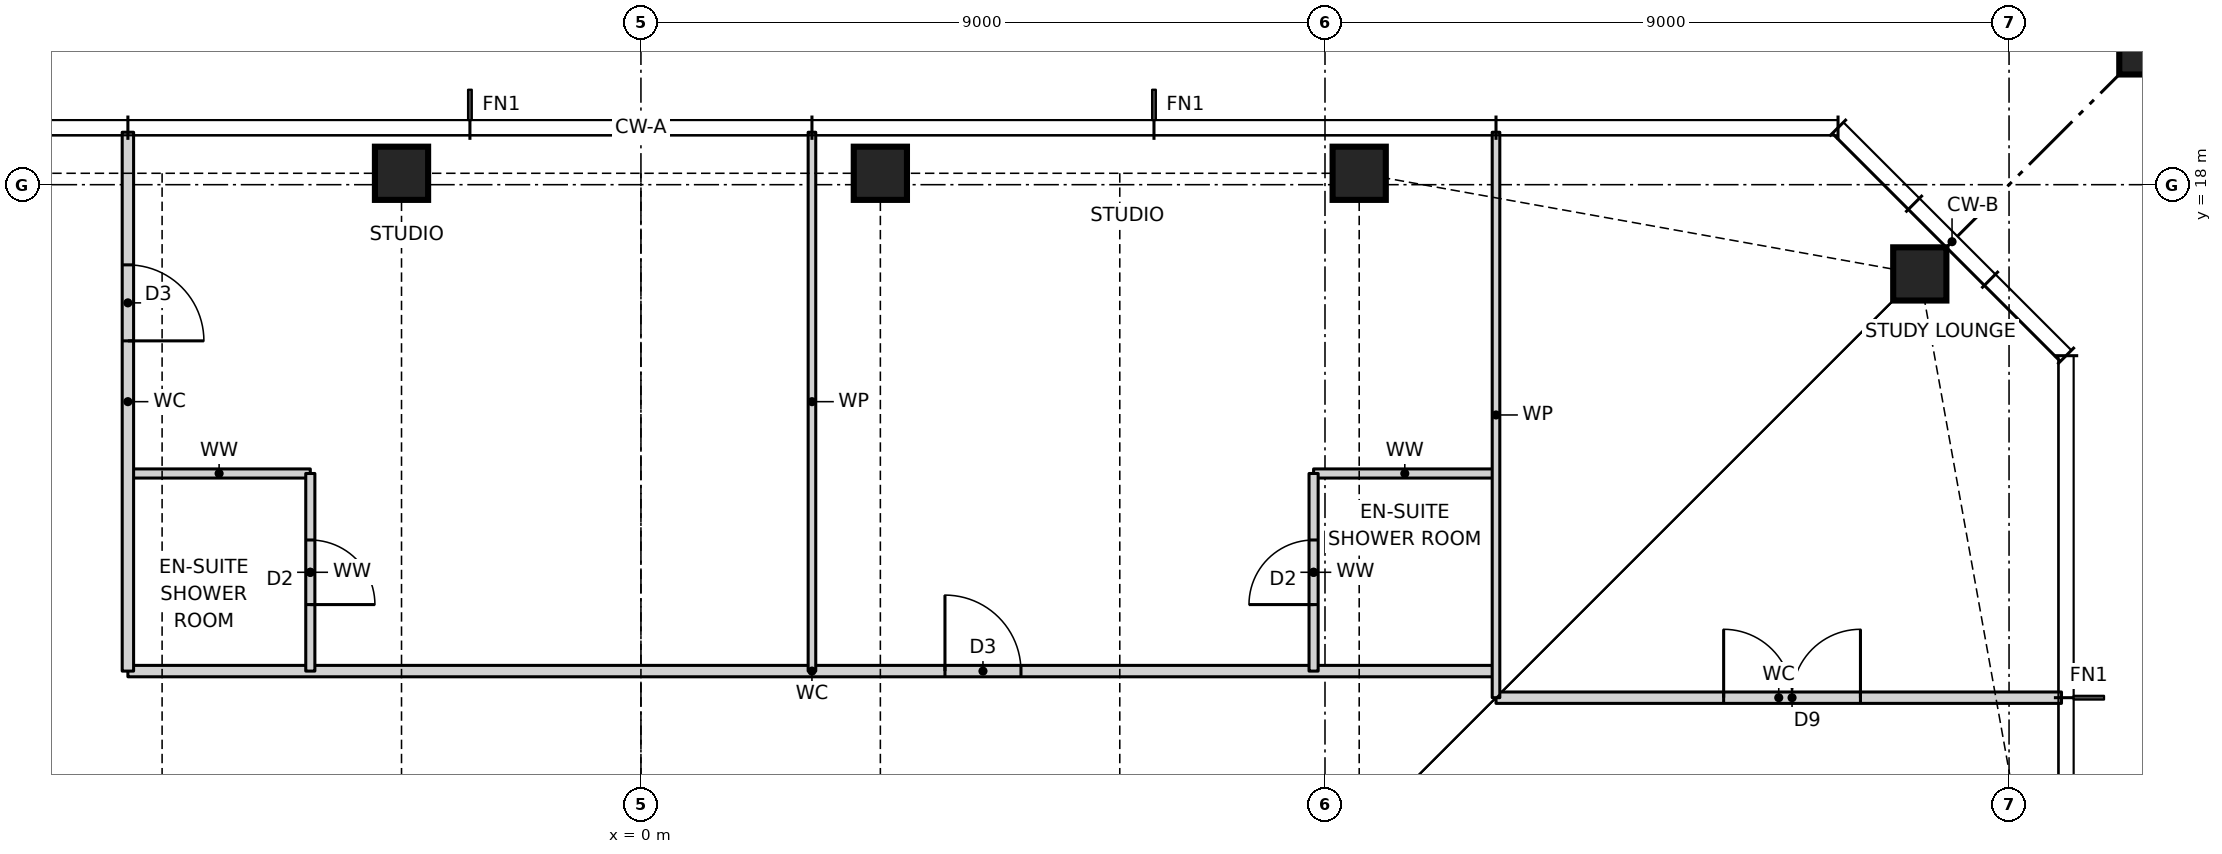
"""IFC4 building model, lengths in metres.
Left out: names, types, materials, properties, quantities, classifications, styles, units other than length and angle.
Written with IfcOpenShell. Run it as: python <this file> out.ifc"""

import sys

from ifc_helpers import new_model, si_unit, direction, frame, frame_2d, origin, origin_2d, place, context, subcontext, project, spatial, rectangle, hollow_rectangle, i_section, extrude, element, fill, save


model = new_model("IFC4")
c1 = context("Model", 3, precision=1e-05, world=origin(), true_north=direction((0.0, 1.0)))
c2 = subcontext(c1, "Body", "Model", "MODEL_VIEW")
j1 = project(units=[si_unit("LENGTHUNIT", "METRE"), si_unit("PLANEANGLEUNIT", "RADIAN")], contexts=[c1])
p1 = place(None, origin())
s1 = spatial("IfcSite", under=j1, at=p1, CompositionType="ELEMENT")
p2 = place(p1, origin())
s2 = spatial("IfcBuilding", under=s1, at=p2, CompositionType="ELEMENT")
p3 = place(p2, frame((0.0, 0.0, 195.0)))
s3 = spatial("IfcBuildingStorey", under=s2, at=p3, CompositionType="ELEMENT", Elevation=195.0)
for number, where, z_axis, x_axis in (
    (1, (16.826, 16.826, 0.0), (0.0, 0.0, 1.0), (1.0, 0.0, 0.0)),
    (2, (9.45, 18.15, 0.0), (0.0, 0.0, 1.0), (1.0, 0.0, 0.0)),
    (3, (3.15, 18.15, 0.0), (0.0, 0.0, 1.0), (1.0, 0.0, 0.0)),
    (4, (-3.15, 18.15, 0.0), (0.0, 0.0, 1.0), (1.0, 0.0, 0.0)),
):
    element("IfcColumn", number, at=place(p3, frame(where, z_axis=z_axis, x_axis=x_axis)), inside=s3, PredefinedType="COLUMN", context=c2, shape_type="SweptSolid", body=[
        extrude(hollow_rectangle(XDim=0.7, YDim=0.7, WallThickness=0.06, at=origin_2d()), origin(), (0.0, 0.0, 1.0), 3.5),
    ])
p4 = place(p3, frame((21.65, 21.65, 0.0), z_axis=(0.0, 0.0, 1.0), x_axis=(1.0, 0.0, 0.0)))
e5 = element("IfcColumn", 5, at=p4, inside=s3, PredefinedType="COLUMN", context=c2, shape_type="SweptSolid", body=[
    extrude(rectangle(XDim=4.4, YDim=4.4, at=origin_2d()), origin(), (0.0, 0.0, 1.0), 3.5),
    extrude(i_section(OverallWidth=0.478, OverallDepth=0.599, WebThickness=0.1, FlangeThickness=0.14, at=origin_2d()), origin(), (0.0, 0.0, 1.0), 3.5),
])
p5 = place(p3, frame((11.25, 11.25, 0.0), z_axis=(0.0, 0.0, 1.0), x_axis=(1.0, 0.0, 0.0)))
e6 = element("IfcWall", 6, at=p5, inside=s3, PredefinedType="PARTITIONING", context=c2, shape_type="SweptSolid", body=[
    extrude(rectangle(XDim=7.44, YDim=0.15, at=frame_2d((3.72, 0.0))), origin(), (0.0, 0.0, 1.0), 3.27),
])
p6 = place(p5, frame((2.995, 0.0, 0.0)))
e7 = element("IfcOpeningElement", 7, at=p6, cuts=e6, PredefinedType="OPENING", context=c2, shape_type="SweptSolid", body=[
    extrude(rectangle(XDim=1.8, YDim=2.1, at=frame_2d((0.9, 1.05))), frame((0.0, 0.085, 0.0), z_axis=(0.0, -1.0, 0.0), x_axis=(1.0, 0.0, 0.0)), (0.0, 0.0, 1.0), 0.17),
])
p7 = place(p3, frame((-6.75, 11.6, 0.0), z_axis=(0.0, 0.0, 1.0), x_axis=(1.0, 0.0, 0.0)))
e8 = element("IfcWall", 8, at=p7, inside=s3, PredefinedType="PARTITIONING", context=c2, shape_type="SweptSolid", body=[
    extrude(rectangle(XDim=18.0, YDim=0.15, at=frame_2d((9.0, 0.0))), origin(), (0.0, 0.0, 1.0), 3.27),
])
p8 = place(p7, frame((10.75, 0.0, 0.0)))
e9 = element("IfcOpeningElement", 9, at=p8, cuts=e8, PredefinedType="OPENING", context=c2, shape_type="SweptSolid", body=[
    extrude(rectangle(XDim=1.0, YDim=2.1, at=frame_2d((0.5, 1.05))), frame((0.0, 0.085, 0.0), z_axis=(0.0, -1.0, 0.0), x_axis=(1.0, 0.0, 0.0)), (0.0, 0.0, 1.0), 0.17),
])
for number, where, z_axis, x_axis in (
    (10, (-6.75, 14.2, 0.0), (0.0, 0.0, 1.0), (1.0, 0.0, 0.0)),
    (11, (8.85, 14.2, 0.0), (0.0, 0.0, 1.0), (1.0, 0.0, 0.0)),
):
    element("IfcWall", number, at=place(p3, frame(where, z_axis=z_axis, x_axis=x_axis)), inside=s3, PredefinedType="PARTITIONING", context=c2, shape_type="SweptSolid", body=[
        extrude(rectangle(XDim=2.4, YDim=0.12, at=frame_2d((1.2, 0.0))), origin(), (0.0, 0.0, 1.0), 3.27),
    ])
p9 = place(p3, frame((11.25, 11.25, 0.0), z_axis=(0.0, 0.0, 1.0), x_axis=(0.0, 1.0, 0.0)))
e12 = element("IfcWall", 12, at=p9, inside=s3, PredefinedType="PARTITIONING", context=c2, shape_type="SweptSolid", body=[
    extrude(rectangle(XDim=7.44, YDim=0.1, at=frame_2d((3.72, 0.0))), origin(), (0.0, 0.0, 1.0), 3.27),
])
p10 = place(p3, frame((8.85, 11.6, 0.0), z_axis=(0.0, 0.0, 1.0), x_axis=(0.0, 1.0, 0.0)))
e13 = element("IfcWall", 13, at=p10, inside=s3, PredefinedType="PARTITIONING", context=c2, shape_type="SweptSolid", body=[
    extrude(rectangle(XDim=2.6, YDim=0.12, at=frame_2d((1.3, 0.0))), origin(), (0.0, 0.0, 1.0), 3.27),
])
p11 = place(p10, frame((0.875, 0.0, 0.0)))
e14 = element("IfcOpeningElement", 14, at=p11, cuts=e13, PredefinedType="OPENING", context=c2, shape_type="SweptSolid", body=[
    extrude(rectangle(XDim=0.85, YDim=2.1, at=frame_2d((0.425, 1.05))), frame((0.0, 0.07, 0.0), z_axis=(0.0, -1.0, 0.0), x_axis=(1.0, 0.0, 0.0)), (0.0, 0.0, 1.0), 0.14),
])
p12 = place(p3, frame((2.25, 11.6, 0.0), z_axis=(0.0, 0.0, 1.0), x_axis=(0.0, 1.0, 0.0)))
e15 = element("IfcWall", 15, at=p12, inside=s3, PredefinedType="PARTITIONING", context=c2, shape_type="SweptSolid", body=[
    extrude(rectangle(XDim=7.09, YDim=0.1, at=frame_2d((3.545, 0.0))), origin(), (0.0, 0.0, 1.0), 3.27),
])
p13 = place(p3, frame((-4.35, 11.6, 0.0), z_axis=(0.0, 0.0, 1.0), x_axis=(0.0, 1.0, 0.0)))
e16 = element("IfcWall", 16, at=p13, inside=s3, PredefinedType="PARTITIONING", context=c2, shape_type="SweptSolid", body=[
    extrude(rectangle(XDim=2.6, YDim=0.12, at=frame_2d((1.3, 0.0))), origin(), (0.0, 0.0, 1.0), 3.27),
])
p14 = place(p13, frame((0.875, 0.0, 0.0)))
e17 = element("IfcOpeningElement", 17, at=p14, cuts=e16, PredefinedType="OPENING", context=c2, shape_type="SweptSolid", body=[
    extrude(rectangle(XDim=0.85, YDim=2.1, at=frame_2d((0.425, 1.05))), frame((0.0, 0.07, 0.0), z_axis=(0.0, -1.0, 0.0), x_axis=(1.0, 0.0, 0.0)), (0.0, 0.0, 1.0), 0.14),
])
p15 = place(p3, frame((-6.75, 11.6, 0.0), z_axis=(0.0, 0.0, 1.0), x_axis=(0.0, 1.0, 0.0)))
e18 = element("IfcWall", 18, at=p15, inside=s3, PredefinedType="PARTITIONING", context=c2, shape_type="SweptSolid", body=[
    extrude(rectangle(XDim=7.09, YDim=0.15, at=frame_2d((3.545, 0.0))), origin(), (0.0, 0.0, 1.0), 3.27),
])
p16 = place(p15, frame((4.345, 0.0, 0.0)))
e19 = element("IfcOpeningElement", 19, at=p16, cuts=e18, PredefinedType="OPENING", context=c2, shape_type="SweptSolid", body=[
    extrude(rectangle(XDim=1.0, YDim=2.1, at=frame_2d((0.5, 1.05))), frame((0.0, 0.085, 0.0), z_axis=(0.0, -1.0, 0.0), x_axis=(1.0, 0.0, 0.0)), (0.0, 0.0, 1.0), 0.17),
])
p17 = place(p8, origin())
e20 = element("IfcDoor", 20, at=p17, inside=s3, OperationType="SINGLE_SWING_LEFT", PredefinedType="DOOR", context=c2, shape_type="SweptSolid", body=[
    extrude(rectangle(XDim=1.0, YDim=2.1, at=frame_2d((0.5, 1.05))), frame((0.0, 0.025, 0.0), z_axis=(0.0, -1.0, 0.0), x_axis=(1.0, 0.0, 0.0)), (0.0, 0.0, 1.0), 0.05),
])
fill(e9, e20)
p18 = place(p11, origin())
e21 = element("IfcDoor", 21, at=p18, inside=s3, OperationType="SINGLE_SWING_LEFT", PredefinedType="DOOR", context=c2, shape_type="SweptSolid", body=[
    extrude(rectangle(XDim=0.85, YDim=2.1, at=frame_2d((0.425, 1.05))), frame((0.0, 0.025, 0.0), z_axis=(0.0, -1.0, 0.0), x_axis=(1.0, 0.0, 0.0)), (0.0, 0.0, 1.0), 0.05),
])
fill(e14, e21)
p19 = place(p16, frame((1.0, 0.0, 0.0), z_axis=(0.0, 0.0, 1.0), x_axis=(-1.0, 0.0, 0.0)))
e22 = element("IfcDoor", 22, at=p19, inside=s3, OperationType="SINGLE_SWING_RIGHT", PredefinedType="DOOR", context=c2, shape_type="SweptSolid", body=[
    extrude(rectangle(XDim=1.0, YDim=2.1, at=frame_2d((0.5, 1.05))), frame((0.0, 0.025, 0.0), z_axis=(0.0, -1.0, 0.0), x_axis=(1.0, 0.0, 0.0)), (0.0, 0.0, 1.0), 0.05),
])
fill(e19, e22)
p20 = place(p14, frame((0.85, 0.0, 0.0), z_axis=(0.0, 0.0, 1.0), x_axis=(-1.0, 0.0, 0.0)))
e23 = element("IfcDoor", 23, at=p20, inside=s3, OperationType="SINGLE_SWING_RIGHT", PredefinedType="DOOR", context=c2, shape_type="SweptSolid", body=[
    extrude(rectangle(XDim=0.85, YDim=2.1, at=frame_2d((0.425, 1.05))), frame((0.0, 0.025, 0.0), z_axis=(0.0, -1.0, 0.0), x_axis=(1.0, 0.0, 0.0)), (0.0, 0.0, 1.0), 0.05),
])
fill(e17, e23)
p21 = place(p6, origin())
e24 = element("IfcDoor", 24, at=p21, inside=s3, OperationType="DOUBLE_DOOR_SINGLE_SWING", PredefinedType="DOOR", context=c2, shape_type="SweptSolid", body=[
    extrude(rectangle(XDim=1.8, YDim=2.1, at=frame_2d((0.9, 1.05))), frame((0.0, 0.025, 0.0), z_axis=(0.0, -1.0, 0.0), x_axis=(1.0, 0.0, 0.0)), (0.0, 0.0, 1.0), 0.05),
])
fill(e7, e24)
save(model, sys.argv[1])
